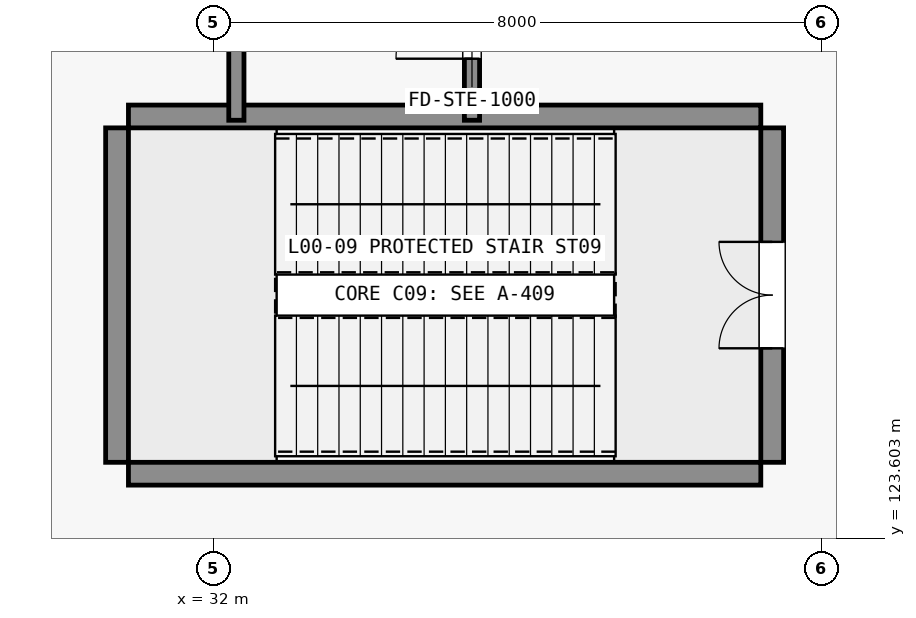
"""IFC4 building model, lengths in metres.
Left out: names, types, materials, properties, quantities, classifications, styles, units other than length and angle.
Written with IfcOpenShell. Run it as: python <this file> out.ifc"""

import sys

from ifc_helpers import new_model, si_unit, direction, frame, frame_2d, origin, place, context, subcontext, project, spatial, rectangle, extrude, element, fill, save


model = new_model("IFC4")
c1 = context("Model", 3, precision=1e-05, world=origin(), true_north=direction((0.0, 1.0)))
c2 = subcontext(c1, "Body", "Model", "MODEL_VIEW")
j1 = project(units=[si_unit("LENGTHUNIT", "METRE"), si_unit("PLANEANGLEUNIT", "RADIAN")], contexts=[c1])
p1 = place(None, origin())
s1 = spatial("IfcSite", under=j1, at=p1, CompositionType="ELEMENT")
p2 = place(p1, origin())
s2 = spatial("IfcBuilding", under=s1, at=p2, CompositionType="ELEMENT")
p3 = place(p2, origin())
s3 = spatial("IfcBuildingStorey", under=s2, at=p3, CompositionType="ELEMENT", Elevation=0.0)
for number, where, z_axis, x_axis in (
    (1, (30.88, 124.45, 0.0), (0.0, 0.0, 1.0), (1.0, 0.0, 0.0)),
    (2, (30.88, 129.15, 0.0), (0.0, 0.0, 1.0), (1.0, 0.0, 0.0)),
):
    element("IfcWall", number, at=place(p3, frame(where, z_axis=z_axis, x_axis=x_axis)), inside=s3, PredefinedType="SHEAR", context=c2, shape_type="SweptSolid", body=[
        extrude(rectangle(XDim=8.32, YDim=0.3, at=frame_2d((4.16, 0.0))), origin(), (0.0, 0.0, 1.0), 6.0),
    ])
p4 = place(p3, frame((30.73, 124.6, 0.0), z_axis=(0.0, 0.0, 1.0), x_axis=(0.0, 1.0, 0.0)))
e3 = element("IfcWall", 3, at=p4, inside=s3, PredefinedType="SHEAR", context=c2, shape_type="SweptSolid", body=[
    extrude(rectangle(XDim=4.4, YDim=0.3, at=frame_2d((2.2, 0.0))), origin(), (0.0, 0.0, 1.0), 6.0),
])
p5 = place(p3, frame((39.35, 124.6, 0.0), z_axis=(0.0, 0.0, 1.0), x_axis=(0.0, 1.0, 0.0)))
e4 = element("IfcWall", 4, at=p5, inside=s3, PredefinedType="SHEAR", context=c2, shape_type="SweptSolid", body=[
    extrude(rectangle(XDim=4.4, YDim=0.3, at=frame_2d((2.2, 0.0))), origin(), (0.0, 0.0, 1.0), 6.0),
])
p6 = place(p5, frame((1.5, 0.0, 0.0)))
e5 = element("IfcOpeningElement", 5, at=p6, cuts=e4, PredefinedType="OPENING", context=c2, shape_type="SweptSolid", body=[
    extrude(rectangle(XDim=1.4, YDim=2.2, at=frame_2d((0.7, 1.1))), frame((0.0, 0.16, 0.0), z_axis=(0.0, -1.0, 0.0), x_axis=(1.0, 0.0, 0.0)), (0.0, 0.0, 1.0), 0.32),
])
p7 = place(p3, frame((32.3, 129.1, 0.0), z_axis=(0.0, 0.0, 1.0), x_axis=(0.0, 1.0, 0.0)))
e6 = element("IfcWall", 6, at=p7, inside=s3, PredefinedType="STANDARD", context=c2, shape_type="SweptSolid", body=[
    extrude(rectangle(XDim=2.62, YDim=0.2, at=frame_2d((1.31, 0.0))), origin(), (0.0, 0.0, 1.0), 5.028),
])
p8 = place(p3, frame((35.4, 129.1, 0.0), z_axis=(0.0, 0.0, 1.0), x_axis=(0.0, 1.0, 0.0)))
e7 = element("IfcWall", 7, at=p8, inside=s3, PredefinedType="STANDARD", context=c2, shape_type="SweptSolid", body=[
    extrude(rectangle(XDim=2.62, YDim=0.2, at=frame_2d((1.31, 0.0))), origin(), (0.0, 0.0, 1.0), 5.028),
])
p9 = place(p8, frame((0.81, 0.0, 0.0)))
e8 = element("IfcOpeningElement", 8, at=p9, cuts=e7, PredefinedType="OPENING", context=c2, shape_type="SweptSolid", body=[
    extrude(rectangle(XDim=1.0, YDim=2.15, at=frame_2d((0.5, 1.075))), frame((0.0, 0.11, 0.0), z_axis=(0.0, -1.0, 0.0), x_axis=(1.0, 0.0, 0.0)), (0.0, 0.0, 1.0), 0.22),
])
p10 = place(p6, origin())
e9 = element("IfcDoor", 9, at=p10, inside=s3, OperationType="DOUBLE_DOOR_SINGLE_SWING", PredefinedType="DOOR", context=c2, shape_type="SweptSolid", body=[
    extrude(rectangle(XDim=1.4, YDim=2.2, at=frame_2d((0.7, 1.1))), frame((0.0, 0.025, 0.0), z_axis=(0.0, -1.0, 0.0), x_axis=(1.0, 0.0, 0.0)), (0.0, 0.0, 1.0), 0.05),
])
fill(e5, e9)
p11 = place(p9, origin())
e10 = element("IfcDoor", 10, at=p11, inside=s3, OperationType="SINGLE_SWING_LEFT", PredefinedType="DOOR", context=c2, shape_type="SweptSolid", body=[
    extrude(rectangle(XDim=1.0, YDim=2.15, at=frame_2d((0.5, 1.075))), frame((0.0, 0.025, 0.0), z_axis=(0.0, -1.0, 0.0), x_axis=(1.0, 0.0, 0.0)), (0.0, 0.0, 1.0), 0.05),
])
fill(e8, e10)
save(model, sys.argv[1])
